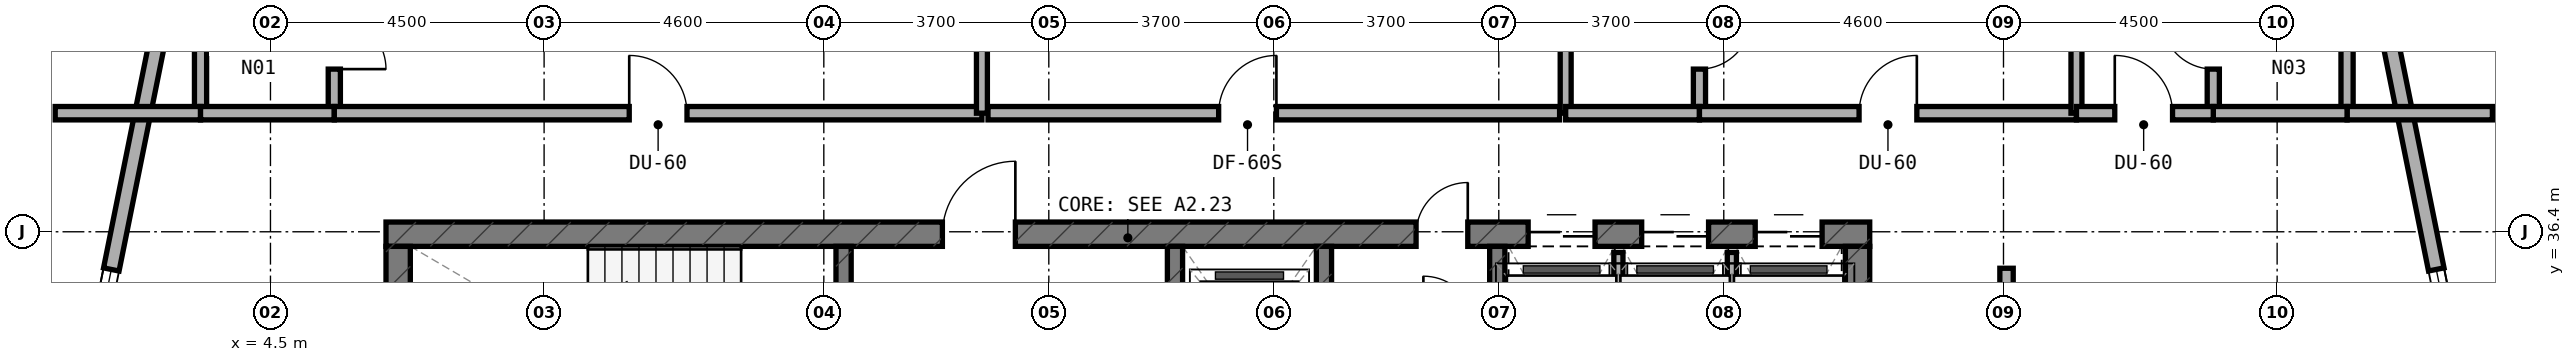
"""IFC4 building model, lengths in metres.
Left out: names, types, materials, properties, quantities, classifications, styles, units other than length and angle.
Written with IfcOpenShell. Run it as: python <this file> out.ifc"""

import sys

from ifc_helpers import new_model, si_unit, direction, frame, frame_2d, origin, place, context, subcontext, project, spatial, rectangle, extrude, element, fill, save


model = new_model("IFC4")
c1 = context("Model", 3, precision=1e-05, world=origin(), true_north=direction((0.0, 1.0)))
c2 = subcontext(c1, "Body", "Model", "MODEL_VIEW")
j1 = project(units=[si_unit("LENGTHUNIT", "METRE"), si_unit("PLANEANGLEUNIT", "RADIAN")], contexts=[c1])
p1 = place(None, origin())
s1 = spatial("IfcSite", under=j1, at=p1, CompositionType="ELEMENT")
p2 = place(p1, origin())
s2 = spatial("IfcBuilding", under=s1, at=p2, CompositionType="ELEMENT")
p3 = place(p2, frame((0.0, 0.0, 98.5)))
s3 = spatial("IfcBuildingStorey", under=s2, at=p3, CompositionType="ELEMENT", Elevation=98.5)
p4 = place(p3, frame((6.4, 36.36, 0.0), z_axis=(0.0, 0.0, 1.0), x_axis=(1.0, 0.0, 0.0)))
e1 = element("IfcWall", 1, at=p4, inside=s3, PredefinedType="SHEAR", context=c2, shape_type="SweptSolid", body=[
    extrude(rectangle(XDim=24.4, YDim=0.4, at=frame_2d((12.2, 0.0))), origin(), (0.0, 0.0, 1.0), 3.5),
])
p5 = place(p4, frame((9.15, 0.0, 0.0)))
e2 = element("IfcOpeningElement", 2, at=p5, cuts=e1, PredefinedType="OPENING", context=c2, shape_type="SweptSolid", body=[
    extrude(rectangle(XDim=1.2, YDim=2.15, at=frame_2d((0.6, 1.075))), frame((0.0, 0.21, 0.0), z_axis=(0.0, -1.0, 0.0), x_axis=(1.0, 0.0, 0.0)), (0.0, 0.0, 1.0), 0.42),
])
p6 = place(p4, frame((16.94, 0.0, 0.0)))
e3 = element("IfcOpeningElement", 3, at=p6, cuts=e1, PredefinedType="OPENING", context=c2, shape_type="SweptSolid", body=[
    extrude(rectangle(XDim=0.85, YDim=2.1, at=frame_2d((0.425, 1.05))), frame((0.0, 0.21, 0.0), z_axis=(0.0, -1.0, 0.0), x_axis=(1.0, 0.0, 0.0)), (0.0, 0.0, 1.0), 0.42),
])
p7 = place(p4, frame((18.783, 0.0, 0.0)))
e4 = element("IfcOpeningElement", 4, at=p7, cuts=e1, PredefinedType="OPENING", context=c2, shape_type="SweptSolid", body=[
    extrude(rectangle(XDim=1.1, YDim=2.15, at=frame_2d((0.55, 1.075))), frame((0.0, 0.21, 0.0), z_axis=(0.0, -1.0, 0.0), x_axis=(1.0, 0.0, 0.0)), (0.0, 0.0, 1.0), 0.42),
])
p8 = place(p4, frame((20.65, 0.0, 0.0)))
e5 = element("IfcOpeningElement", 5, at=p8, cuts=e1, PredefinedType="OPENING", context=c2, shape_type="SweptSolid", body=[
    extrude(rectangle(XDim=1.1, YDim=2.15, at=frame_2d((0.55, 1.075))), frame((0.0, 0.21, 0.0), z_axis=(0.0, -1.0, 0.0), x_axis=(1.0, 0.0, 0.0)), (0.0, 0.0, 1.0), 0.42),
])
p9 = place(p4, frame((22.517, 0.0, 0.0)))
e6 = element("IfcOpeningElement", 6, at=p9, cuts=e1, PredefinedType="OPENING", context=c2, shape_type="SweptSolid", body=[
    extrude(rectangle(XDim=1.1, YDim=2.15, at=frame_2d((0.55, 1.075))), frame((0.0, 0.21, 0.0), z_axis=(0.0, -1.0, 0.0), x_axis=(1.0, 0.0, 0.0)), (0.0, 0.0, 1.0), 0.42),
])
for number, where, z_axis, x_axis in (
    (7, (6.6, 33.0, 0.0), (0.0, 0.0, 1.0), (0.0, 1.0, 0.0)),
    (8, (30.6, 33.0, 0.0), (0.0, 0.0, 1.0), (0.0, 1.0, 0.0)),
):
    element("IfcWall", number, at=place(p3, frame(where, z_axis=z_axis, x_axis=x_axis)), inside=s3, PredefinedType="SHEAR", context=c2, shape_type="SweptSolid", body=[
        extrude(rectangle(XDim=3.16, YDim=0.4, at=frame_2d((1.58, 0.0))), origin(), (0.0, 0.0, 1.0), 3.5),
    ])
p10 = place(p3, frame((13.925, 33.0, 0.0), z_axis=(0.0, 0.0, 1.0), x_axis=(0.0, 1.0, 0.0)))
e9 = element("IfcWall", 9, at=p10, inside=s3, PredefinedType="STANDARD", context=c2, shape_type="SweptSolid", body=[
    extrude(rectangle(XDim=3.16, YDim=0.25, at=frame_2d((1.58, 0.0))), origin(), (0.0, 0.0, 1.0), 3.22),
])
p11 = place(p10, frame((0.98, 0.0, 0.0)))
e10 = element("IfcOpeningElement", 10, at=p11, cuts=e9, PredefinedType="OPENING", context=c2, shape_type="SweptSolid", body=[
    extrude(rectangle(XDim=1.1, YDim=2.15, at=frame_2d((0.55, 1.075))), frame((0.0, 0.135, 0.0), z_axis=(0.0, -1.0, 0.0), x_axis=(1.0, 0.0, 0.0)), (0.0, 0.0, 1.0), 0.27),
])
p12 = place(p3, frame((19.375, 33.0, 0.0), z_axis=(0.0, 0.0, 1.0), x_axis=(0.0, 1.0, 0.0)))
e11 = element("IfcWall", 11, at=p12, inside=s3, PredefinedType="STANDARD", context=c2, shape_type="SweptSolid", body=[
    extrude(rectangle(XDim=3.16, YDim=0.25, at=frame_2d((1.58, 0.0))), origin(), (0.0, 0.0, 1.0), 3.22),
])
p13 = place(p12, frame((0.98, 0.0, 0.0)))
e12 = element("IfcOpeningElement", 12, at=p13, cuts=e11, PredefinedType="OPENING", context=c2, shape_type="SweptSolid", body=[
    extrude(rectangle(XDim=1.1, YDim=2.15, at=frame_2d((0.55, 1.075))), frame((0.0, 0.135, 0.0), z_axis=(0.0, -1.0, 0.0), x_axis=(1.0, 0.0, 0.0)), (0.0, 0.0, 1.0), 0.27),
])
for number, where, z_axis, x_axis in (
    (13, (21.825, 33.0, 0.0), (0.0, 0.0, 1.0), (0.0, 1.0, 0.0)),
    (14, (24.675, 33.0, 0.0), (0.0, 0.0, 1.0), (0.0, 1.0, 0.0)),
):
    element("IfcWall", number, at=place(p3, frame(where, z_axis=z_axis, x_axis=x_axis)), inside=s3, PredefinedType="STANDARD", context=c2, shape_type="SweptSolid", body=[
        extrude(rectangle(XDim=3.16, YDim=0.25, at=frame_2d((1.58, 0.0))), origin(), (0.0, 0.0, 1.0), 3.22),
    ])
p14 = place(p3, frame((41.084, 30.98, 0.0), z_axis=(0.0, 0.0, 1.0), x_axis=(-0.197435082048, 0.980315963543, 0.0)))
e15 = element("IfcWall", 15, at=p14, inside=s3, PredefinedType="STANDARD", context=c2, shape_type="SweptSolid", body=[
    extrude(rectangle(XDim=9.183, YDim=0.26, at=frame_2d((4.591, 0.0))), origin(), (0.0, 0.0, 1.0), 3.22),
])
p15 = place(p14, frame((2.497, 0.0, 0.8)))
e16 = element("IfcOpeningElement", 16, at=p15, cuts=e15, PredefinedType="OPENING", context=c2, shape_type="SweptSolid", body=[
    extrude(rectangle(XDim=2.4, YDim=1.6, at=frame_2d((1.2, 0.8))), frame((0.0, 0.14, 0.0), z_axis=(0.0, -1.0, 0.0), x_axis=(1.0, 0.0, 0.0)), (0.0, 0.0, 1.0), 0.28),
])
p16 = place(p3, frame((2.729, 39.982, 0.0), z_axis=(0.0, 0.0, 1.0), x_axis=(-0.197435082048, -0.980315963543, 0.0)))
e17 = element("IfcWall", 17, at=p16, inside=s3, PredefinedType="STANDARD", context=c2, shape_type="SweptSolid", body=[
    extrude(rectangle(XDim=9.183, YDim=0.26, at=frame_2d((4.591, 0.0))), origin(), (0.0, 0.0, 1.0), 3.22),
])
p17 = place(p16, frame((4.286, 0.0, 0.8)))
e18 = element("IfcOpeningElement", 18, at=p17, cuts=e17, PredefinedType="OPENING", context=c2, shape_type="SweptSolid", body=[
    extrude(rectangle(XDim=2.4, YDim=1.6, at=frame_2d((1.2, 0.8))), frame((0.0, 0.14, 0.0), z_axis=(0.0, -1.0, 0.0), x_axis=(1.0, 0.0, 0.0)), (0.0, 0.0, 1.0), 0.28),
])
p18 = place(p3, frame((26.667, 33.1, 0.0), z_axis=(0.0, 0.0, 1.0), x_axis=(0.0, 1.0, 0.0)))
e19 = element("IfcWall", 19, at=p18, inside=s3, PredefinedType="PARTITIONING", context=c2, shape_type="SweptSolid", body=[
    extrude(rectangle(XDim=2.96, YDim=0.15, at=frame_2d((1.48, 0.0))), origin(), (0.0, 0.0, 1.0), 3.22),
])
p19 = place(p3, frame((28.533, 33.1, 0.0), z_axis=(0.0, 0.0, 1.0), x_axis=(0.0, 1.0, 0.0)))
e20 = element("IfcWall", 20, at=p19, inside=s3, PredefinedType="PARTITIONING", context=c2, shape_type="SweptSolid", body=[
    extrude(rectangle(XDim=2.96, YDim=0.15, at=frame_2d((1.48, 0.0))), origin(), (0.0, 0.0, 1.0), 2.595),
])
p20 = place(p3, frame((5.55, 38.45, 0.0), z_axis=(0.0, 0.0, 1.0), x_axis=(0.0, 1.0, 0.0)))
e21 = element("IfcWall", 21, at=p20, inside=s3, PredefinedType="PLUMBINGWALL", context=c2, shape_type="SweptSolid", body=[
    extrude(rectangle(XDim=2.1, YDim=0.2, at=frame_2d((1.05, 0.0))), origin(), (0.0, 0.0, 1.0), 3.22),
])
p21 = place(p20, frame((0.625, 0.0, 0.0)))
e22 = element("IfcOpeningElement", 22, at=p21, cuts=e21, PredefinedType="OPENING", context=c2, shape_type="SweptSolid", body=[
    extrude(rectangle(XDim=0.85, YDim=2.1, at=frame_2d((0.425, 1.05))), frame((0.0, 0.11, 0.0), z_axis=(0.0, -1.0, 0.0), x_axis=(1.0, 0.0, 0.0)), (0.0, 0.0, 1.0), 0.22),
])
p22 = place(p3, frame((3.35, 38.45, 0.0), z_axis=(0.0, 0.0, 1.0), x_axis=(0.0, 1.0, 0.0)))
e23 = element("IfcWall", 23, at=p22, inside=s3, PredefinedType="PLUMBINGWALL", context=c2, shape_type="SweptSolid", body=[
    extrude(rectangle(XDim=2.1, YDim=0.2, at=frame_2d((1.05, 0.0))), origin(), (0.0, 0.0, 1.0), 3.22),
])
p23 = place(p3, frame((0.96, 38.35, 0.0), z_axis=(0.0, 0.0, 1.0), x_axis=(1.0, 0.0, 0.0)))
e24 = element("IfcWall", 24, at=p23, inside=s3, PredefinedType="SOLIDWALL", context=c2, shape_type="SweptSolid", body=[
    extrude(rectangle(XDim=2.39, YDim=0.22, at=frame_2d((1.195, 0.0))), origin(), (0.0, 0.0, 1.0), 3.22),
])
p24 = place(p3, frame((3.35, 38.35, 0.0), z_axis=(0.0, 0.0, 1.0), x_axis=(1.0, 0.0, 0.0)))
e25 = element("IfcWall", 25, at=p24, inside=s3, PredefinedType="SOLIDWALL", context=c2, shape_type="SweptSolid", body=[
    extrude(rectangle(XDim=2.2, YDim=0.22, at=frame_2d((1.1, 0.0))), origin(), (0.0, 0.0, 1.0), 3.22),
])
p25 = place(p3, frame((5.55, 38.35, 0.0), z_axis=(0.0, 0.0, 1.0), x_axis=(1.0, 0.0, 0.0)))
e26 = element("IfcWall", 26, at=p25, inside=s3, PredefinedType="SOLIDWALL", context=c2, shape_type="SweptSolid", body=[
    extrude(rectangle(XDim=10.65, YDim=0.22, at=frame_2d((5.325, 0.0))), origin(), (0.0, 0.0, 1.0), 2.595),
])
p26 = place(p25, frame((4.85, 0.0, 0.0)))
e27 = element("IfcOpeningElement", 27, at=p26, cuts=e26, PredefinedType="OPENING", context=c2, shape_type="SweptSolid", body=[
    extrude(rectangle(XDim=0.95, YDim=2.1, at=frame_2d((0.475, 1.05))), frame((0.0, 0.12, 0.0), z_axis=(0.0, -1.0, 0.0), x_axis=(1.0, 0.0, 0.0)), (0.0, 0.0, 1.0), 0.24),
])
p27 = place(p3, frame((16.2, 38.35, 0.0), z_axis=(0.0, 0.0, 1.0), x_axis=(0.0, 1.0, 0.0)))
e28 = element("IfcWall", 28, at=p27, inside=s3, PredefinedType="SOLIDWALL", context=c2, shape_type="SweptSolid", body=[
    extrude(rectangle(XDim=6.79, YDim=0.18, at=frame_2d((3.395, 0.0))), origin(), (0.0, 0.0, 1.0), 2.595),
])
p28 = place(p3, frame((16.3, 38.35, 0.0), z_axis=(0.0, 0.0, 1.0), x_axis=(1.0, 0.0, 0.0)))
e29 = element("IfcWall", 29, at=p28, inside=s3, PredefinedType="SOLIDWALL", context=c2, shape_type="SweptSolid", body=[
    extrude(rectangle(XDim=9.4, YDim=0.22, at=frame_2d((4.7, 0.0))), origin(), (0.0, 0.0, 1.0), 3.22),
])
p29 = place(p28, frame((3.793, 0.0, 0.0)))
e30 = element("IfcOpeningElement", 30, at=p29, cuts=e29, PredefinedType="OPENING", context=c2, shape_type="SweptSolid", body=[
    extrude(rectangle(XDim=0.95, YDim=2.1, at=frame_2d((0.475, 1.05))), frame((0.0, 0.12, 0.0), z_axis=(0.0, -1.0, 0.0), x_axis=(1.0, 0.0, 0.0)), (0.0, 0.0, 1.0), 0.24),
])
p30 = place(p3, frame((25.8, 38.35, 0.0), z_axis=(0.0, 0.0, 1.0), x_axis=(0.0, 1.0, 0.0)))
e31 = element("IfcWall", 31, at=p30, inside=s3, PredefinedType="SOLIDWALL", context=c2, shape_type="SweptSolid", body=[
    extrude(rectangle(XDim=6.79, YDim=0.18, at=frame_2d((3.395, 0.0))), origin(), (0.0, 0.0, 1.0), 2.595),
])
p31 = place(p3, frame((28.0, 38.45, 0.0), z_axis=(0.0, 0.0, 1.0), x_axis=(0.0, 1.0, 0.0)))
e32 = element("IfcWall", 32, at=p31, inside=s3, PredefinedType="PLUMBINGWALL", context=c2, shape_type="SweptSolid", body=[
    extrude(rectangle(XDim=2.1, YDim=0.2, at=frame_2d((1.05, 0.0))), origin(), (0.0, 0.0, 1.0), 2.835),
])
p32 = place(p31, frame((0.625, 0.0, 0.0)))
e33 = element("IfcOpeningElement", 33, at=p32, cuts=e32, PredefinedType="OPENING", context=c2, shape_type="SweptSolid", body=[
    extrude(rectangle(XDim=0.85, YDim=2.1, at=frame_2d((0.425, 1.05))), frame((0.0, 0.11, 0.0), z_axis=(0.0, -1.0, 0.0), x_axis=(1.0, 0.0, 0.0)), (0.0, 0.0, 1.0), 0.22),
])
p33 = place(p3, frame((25.8, 38.35, 0.0), z_axis=(0.0, 0.0, 1.0), x_axis=(1.0, 0.0, 0.0)))
e34 = element("IfcWall", 34, at=p33, inside=s3, PredefinedType="SOLIDWALL", context=c2, shape_type="SweptSolid", body=[
    extrude(rectangle(XDim=2.2, YDim=0.22, at=frame_2d((1.1, 0.0))), origin(), (0.0, 0.0, 1.0), 2.595),
])
p34 = place(p3, frame((28.0, 38.35, 0.0), z_axis=(0.0, 0.0, 1.0), x_axis=(1.0, 0.0, 0.0)))
e35 = element("IfcWall", 35, at=p34, inside=s3, PredefinedType="SOLIDWALL", context=c2, shape_type="SweptSolid", body=[
    extrude(rectangle(XDim=6.2, YDim=0.22, at=frame_2d((3.1, 0.0))), origin(), (0.0, 0.0, 1.0), 2.595),
])
p35 = place(p34, frame((2.625, 0.0, 0.0)))
e36 = element("IfcOpeningElement", 36, at=p35, cuts=e35, PredefinedType="OPENING", context=c2, shape_type="SweptSolid", body=[
    extrude(rectangle(XDim=0.95, YDim=2.1, at=frame_2d((0.475, 1.05))), frame((0.0, 0.12, 0.0), z_axis=(0.0, -1.0, 0.0), x_axis=(1.0, 0.0, 0.0)), (0.0, 0.0, 1.0), 0.24),
])
p36 = place(p3, frame((34.2, 38.35, 0.0), z_axis=(0.0, 0.0, 1.0), x_axis=(0.0, 1.0, 0.0)))
e37 = element("IfcWall", 37, at=p36, inside=s3, PredefinedType="SOLIDWALL", context=c2, shape_type="SweptSolid", body=[
    extrude(rectangle(XDim=5.351, YDim=0.18, at=frame_2d((2.675, 0.0))), origin(), (0.0, 0.0, 1.0), 2.595),
])
p37 = place(p3, frame((36.45, 38.45, 0.0), z_axis=(0.0, 0.0, 1.0), x_axis=(0.0, 1.0, 0.0)))
e38 = element("IfcWall", 38, at=p37, inside=s3, PredefinedType="PLUMBINGWALL", context=c2, shape_type="SweptSolid", body=[
    extrude(rectangle(XDim=2.1, YDim=0.2, at=frame_2d((1.05, 0.0))), origin(), (0.0, 0.0, 1.0), 3.22),
])
p38 = place(p37, frame((0.625, 0.0, 0.0)))
e39 = element("IfcOpeningElement", 39, at=p38, cuts=e38, PredefinedType="OPENING", context=c2, shape_type="SweptSolid", body=[
    extrude(rectangle(XDim=0.85, YDim=2.1, at=frame_2d((0.425, 1.05))), frame((0.0, 0.11, 0.0), z_axis=(0.0, -1.0, 0.0), x_axis=(1.0, 0.0, 0.0)), (0.0, 0.0, 1.0), 0.22),
])
p39 = place(p3, frame((38.65, 38.45, 0.0), z_axis=(0.0, 0.0, 1.0), x_axis=(0.0, 1.0, 0.0)))
e40 = element("IfcWall", 40, at=p39, inside=s3, PredefinedType="PLUMBINGWALL", context=c2, shape_type="SweptSolid", body=[
    extrude(rectangle(XDim=2.1, YDim=0.2, at=frame_2d((1.05, 0.0))), origin(), (0.0, 0.0, 1.0), 3.22),
])
p40 = place(p3, frame((38.65, 38.35, 0.0), z_axis=(0.0, 0.0, 1.0), x_axis=(1.0, 0.0, 0.0)))
e41 = element("IfcWall", 41, at=p40, inside=s3, PredefinedType="SOLIDWALL", context=c2, shape_type="SweptSolid", body=[
    extrude(rectangle(XDim=2.39, YDim=0.22, at=frame_2d((1.195, 0.0))), origin(), (0.0, 0.0, 1.0), 3.22),
])
p41 = place(p3, frame((36.45, 38.35, 0.0), z_axis=(0.0, 0.0, 1.0), x_axis=(1.0, 0.0, 0.0)))
e42 = element("IfcWall", 42, at=p41, inside=s3, PredefinedType="SOLIDWALL", context=c2, shape_type="SweptSolid", body=[
    extrude(rectangle(XDim=2.2, YDim=0.22, at=frame_2d((1.1, 0.0))), origin(), (0.0, 0.0, 1.0), 3.22),
])
p42 = place(p3, frame((34.2, 38.35, 0.0), z_axis=(0.0, 0.0, 1.0), x_axis=(1.0, 0.0, 0.0)))
e43 = element("IfcWall", 43, at=p42, inside=s3, PredefinedType="SOLIDWALL", context=c2, shape_type="SweptSolid", body=[
    extrude(rectangle(XDim=2.25, YDim=0.22, at=frame_2d((1.125, 0.0))), origin(), (0.0, 0.0, 1.0), 2.595),
])
p43 = place(p42, frame((0.63, 0.0, 0.0)))
e44 = element("IfcOpeningElement", 44, at=p43, cuts=e43, PredefinedType="OPENING", context=c2, shape_type="SweptSolid", body=[
    extrude(rectangle(XDim=0.95, YDim=2.1, at=frame_2d((0.475, 1.05))), frame((0.0, 0.12, 0.0), z_axis=(0.0, -1.0, 0.0), x_axis=(1.0, 0.0, 0.0)), (0.0, 0.0, 1.0), 0.24),
])
p44 = place(p3, frame((33.05, 30.593, 0.0), z_axis=(0.0, 0.0, 1.0), x_axis=(0.0, 1.0, 0.0)))
e45 = element("IfcWall", 45, at=p44, inside=s3, PredefinedType="SOLIDWALL", context=c2, shape_type="SweptSolid", body=[
    extrude(rectangle(XDim=5.207, YDim=0.22, at=frame_2d((2.604, 0.0))), origin(), (0.0, 0.0, 1.0), 2.595),
])
p45 = place(p44, frame((2.128, 0.0, 0.0)))
e46 = element("IfcOpeningElement", 46, at=p45, cuts=e45, PredefinedType="OPENING", context=c2, shape_type="SweptSolid", body=[
    extrude(rectangle(XDim=0.95, YDim=2.1, at=frame_2d((0.475, 1.05))), frame((0.0, 0.12, 0.0), z_axis=(0.0, -1.0, 0.0), x_axis=(1.0, 0.0, 0.0)), (0.0, 0.0, 1.0), 0.24),
])
p46 = place(p15, origin())
e47 = element("IfcWindow", 47, at=p46, inside=s3, PartitioningType="SINGLE_PANEL", PredefinedType="WINDOW", context=c2, shape_type="SweptSolid", body=[
    extrude(rectangle(XDim=2.4, YDim=1.6, at=frame_2d((1.2, 0.8))), frame((0.0, 0.03, 0.0), z_axis=(0.0, -1.0, 0.0), x_axis=(1.0, 0.0, 0.0)), (0.0, 0.0, 1.0), 0.06),
])
fill(e16, e47)
p47 = place(p17, origin())
e48 = element("IfcWindow", 48, at=p47, inside=s3, PartitioningType="SINGLE_PANEL", PredefinedType="WINDOW", context=c2, shape_type="SweptSolid", body=[
    extrude(rectangle(XDim=2.4, YDim=1.6, at=frame_2d((1.2, 0.8))), frame((0.0, 0.03, 0.0), z_axis=(0.0, -1.0, 0.0), x_axis=(1.0, 0.0, 0.0)), (0.0, 0.0, 1.0), 0.06),
])
fill(e18, e48)
p48 = place(p5, origin())
e49 = element("IfcDoor", 49, at=p48, inside=s3, OperationType="SINGLE_SWING_RIGHT", PredefinedType="DOOR", context=c2, shape_type="SweptSolid", body=[
    extrude(rectangle(XDim=1.2, YDim=2.15, at=frame_2d((0.6, 1.075))), frame((0.0, 0.025, 0.0), z_axis=(0.0, -1.0, 0.0), x_axis=(1.0, 0.0, 0.0)), (0.0, 0.0, 1.0), 0.05),
])
fill(e2, e49)
p49 = place(p6, origin())
e50 = element("IfcDoor", 50, at=p49, inside=s3, OperationType="SINGLE_SWING_RIGHT", PredefinedType="DOOR", context=c2, shape_type="SweptSolid", body=[
    extrude(rectangle(XDim=0.85, YDim=2.1, at=frame_2d((0.425, 1.05))), frame((0.0, 0.025, 0.0), z_axis=(0.0, -1.0, 0.0), x_axis=(1.0, 0.0, 0.0)), (0.0, 0.0, 1.0), 0.05),
])
fill(e3, e50)
p50 = place(p7, origin())
e51 = element("IfcDoor", 51, at=p50, inside=s3, OperationType="DOUBLE_DOOR_SLIDING", PredefinedType="DOOR", context=c2, shape_type="SweptSolid", body=[
    extrude(rectangle(XDim=1.1, YDim=2.15, at=frame_2d((0.55, 1.075))), frame((0.0, 0.025, 0.0), z_axis=(0.0, -1.0, 0.0), x_axis=(1.0, 0.0, 0.0)), (0.0, 0.0, 1.0), 0.05),
])
fill(e4, e51)
p51 = place(p8, origin())
e52 = element("IfcDoor", 52, at=p51, inside=s3, OperationType="DOUBLE_DOOR_SLIDING", PredefinedType="DOOR", context=c2, shape_type="SweptSolid", body=[
    extrude(rectangle(XDim=1.1, YDim=2.15, at=frame_2d((0.55, 1.075))), frame((0.0, 0.025, 0.0), z_axis=(0.0, -1.0, 0.0), x_axis=(1.0, 0.0, 0.0)), (0.0, 0.0, 1.0), 0.05),
])
fill(e5, e52)
p52 = place(p9, origin())
e53 = element("IfcDoor", 53, at=p52, inside=s3, OperationType="DOUBLE_DOOR_SLIDING", PredefinedType="DOOR", context=c2, shape_type="SweptSolid", body=[
    extrude(rectangle(XDim=1.1, YDim=2.15, at=frame_2d((0.55, 1.075))), frame((0.0, 0.025, 0.0), z_axis=(0.0, -1.0, 0.0), x_axis=(1.0, 0.0, 0.0)), (0.0, 0.0, 1.0), 0.05),
])
fill(e6, e53)
p53 = place(p21, frame((0.85, 0.0, 0.0), z_axis=(0.0, 0.0, 1.0), x_axis=(-1.0, 0.0, 0.0)))
e54 = element("IfcDoor", 54, at=p53, inside=s3, OperationType="SINGLE_SWING_RIGHT", PredefinedType="DOOR", context=c2, shape_type="SweptSolid", body=[
    extrude(rectangle(XDim=0.85, YDim=2.1, at=frame_2d((0.425, 1.05))), frame((0.0, 0.025, 0.0), z_axis=(0.0, -1.0, 0.0), x_axis=(1.0, 0.0, 0.0)), (0.0, 0.0, 1.0), 0.05),
])
fill(e22, e54)
p54 = place(p26, origin())
e55 = element("IfcDoor", 55, at=p54, inside=s3, OperationType="SINGLE_SWING_LEFT", PredefinedType="DOOR", context=c2, shape_type="SweptSolid", body=[
    extrude(rectangle(XDim=0.95, YDim=2.1, at=frame_2d((0.475, 1.05))), frame((0.0, 0.025, 0.0), z_axis=(0.0, -1.0, 0.0), x_axis=(1.0, 0.0, 0.0)), (0.0, 0.0, 1.0), 0.05),
])
fill(e27, e55)
p55 = place(p29, origin())
e56 = element("IfcDoor", 56, at=p55, inside=s3, OperationType="SINGLE_SWING_RIGHT", PredefinedType="DOOR", context=c2, shape_type="SweptSolid", body=[
    extrude(rectangle(XDim=0.95, YDim=2.1, at=frame_2d((0.475, 1.05))), frame((0.0, 0.025, 0.0), z_axis=(0.0, -1.0, 0.0), x_axis=(1.0, 0.0, 0.0)), (0.0, 0.0, 1.0), 0.05),
])
fill(e30, e56)
p56 = place(p32, frame((0.85, 0.0, 0.0), z_axis=(0.0, 0.0, 1.0), x_axis=(-1.0, 0.0, 0.0)))
e57 = element("IfcDoor", 57, at=p56, inside=s3, OperationType="SINGLE_SWING_LEFT", PredefinedType="DOOR", context=c2, shape_type="SweptSolid", body=[
    extrude(rectangle(XDim=0.85, YDim=2.1, at=frame_2d((0.425, 1.05))), frame((0.0, 0.025, 0.0), z_axis=(0.0, -1.0, 0.0), x_axis=(1.0, 0.0, 0.0)), (0.0, 0.0, 1.0), 0.05),
])
fill(e33, e57)
p57 = place(p35, origin())
e58 = element("IfcDoor", 58, at=p57, inside=s3, OperationType="SINGLE_SWING_RIGHT", PredefinedType="DOOR", context=c2, shape_type="SweptSolid", body=[
    extrude(rectangle(XDim=0.95, YDim=2.1, at=frame_2d((0.475, 1.05))), frame((0.0, 0.025, 0.0), z_axis=(0.0, -1.0, 0.0), x_axis=(1.0, 0.0, 0.0)), (0.0, 0.0, 1.0), 0.05),
])
fill(e36, e58)
p58 = place(p38, origin())
e59 = element("IfcDoor", 59, at=p58, inside=s3, OperationType="SINGLE_SWING_RIGHT", PredefinedType="DOOR", context=c2, shape_type="SweptSolid", body=[
    extrude(rectangle(XDim=0.85, YDim=2.1, at=frame_2d((0.425, 1.05))), frame((0.0, 0.025, 0.0), z_axis=(0.0, -1.0, 0.0), x_axis=(1.0, 0.0, 0.0)), (0.0, 0.0, 1.0), 0.05),
])
fill(e39, e59)
p59 = place(p43, origin())
e60 = element("IfcDoor", 60, at=p59, inside=s3, OperationType="SINGLE_SWING_LEFT", PredefinedType="DOOR", context=c2, shape_type="SweptSolid", body=[
    extrude(rectangle(XDim=0.95, YDim=2.1, at=frame_2d((0.475, 1.05))), frame((0.0, 0.025, 0.0), z_axis=(0.0, -1.0, 0.0), x_axis=(1.0, 0.0, 0.0)), (0.0, 0.0, 1.0), 0.05),
])
fill(e44, e60)
save(model, sys.argv[1])
